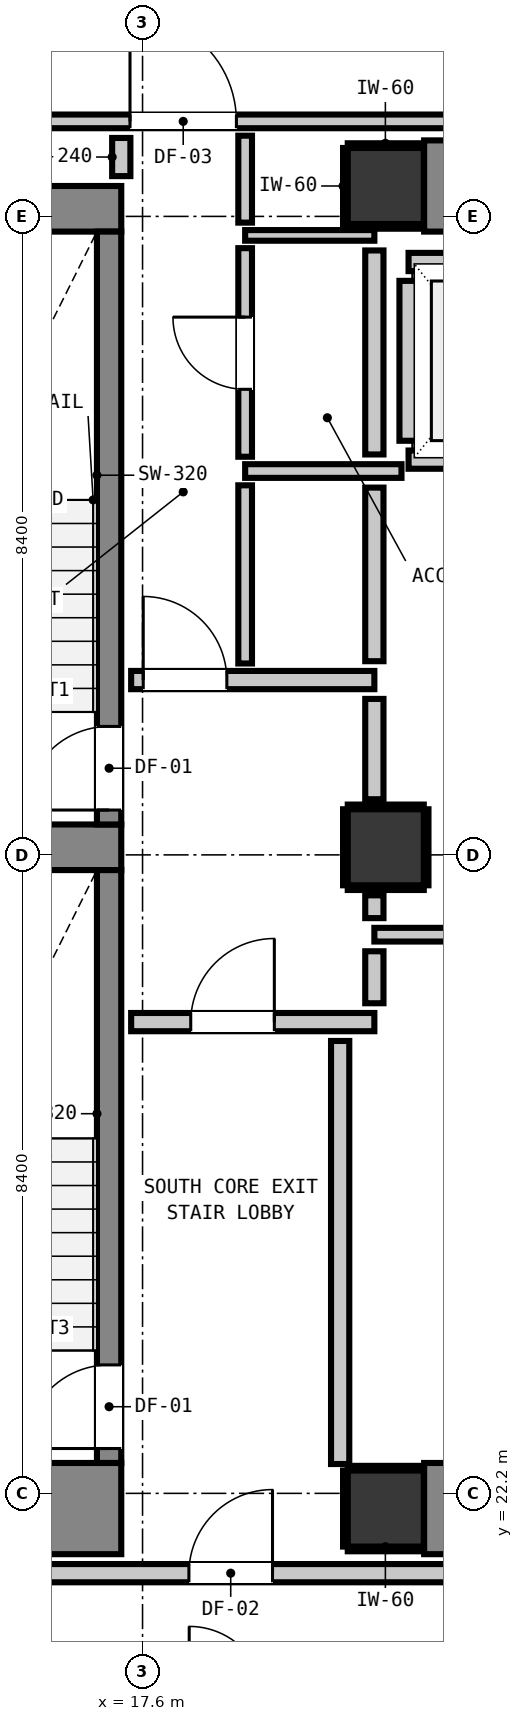
"""IFC4 building model, lengths in metres.
Left out: names, types, materials, properties, quantities, classifications, styles, units other than length and angle.
Written with IfcOpenShell. Run it as: python <this file> out.ifc"""

import sys

from ifc_helpers import new_model, si_unit, direction, frame, frame_2d, origin, origin_2d, place, context, subcontext, project, spatial, rectangle, extrude, element, fill, save


model = new_model("IFC4")
c1 = context("Model", 3, precision=1e-05, world=origin(), true_north=direction((0.0, 1.0)))
c2 = subcontext(c1, "Body", "Model", "MODEL_VIEW")
j1 = project(units=[si_unit("LENGTHUNIT", "METRE"), si_unit("PLANEANGLEUNIT", "RADIAN")], contexts=[c1])
p1 = place(None, origin())
s1 = spatial("IfcSite", under=j1, at=p1, CompositionType="ELEMENT")
p2 = place(p1, origin())
s2 = spatial("IfcBuilding", under=s1, at=p2, CompositionType="ELEMENT")
p3 = place(p2, frame((0.0, 0.0, 68.48)))
s3 = spatial("IfcBuildingStorey", under=s2, at=p3, CompositionType="ELEMENT", Elevation=68.48)
for number, where, z_axis, x_axis in (
    (1, (20.8, 22.0, 0.0), (0.0, 0.0, 1.0), (1.0, 0.0, 0.0)),
    (2, (20.8, 39.4, 0.0), (0.0, 0.0, 1.0), (1.0, 0.0, 0.0)),
):
    element("IfcColumn", number, at=place(p3, frame(where, z_axis=z_axis, x_axis=x_axis)), inside=s3, PredefinedType="COLUMN", context=c2, shape_type="SweptSolid", body=[
        extrude(rectangle(XDim=1.0, YDim=1.0, at=origin_2d()), origin(), (0.0, 0.0, 1.0), 3.32),
    ])
p4 = place(p3, frame((13.24, 22.0, 0.0), z_axis=(0.0, 0.0, 1.0), x_axis=(1.0, 0.0, 0.0)))
e3 = element("IfcWall", 3, at=p4, inside=s3, PredefinedType="SHEAR", context=c2, shape_type="SweptSolid", body=[
    extrude(rectangle(XDim=4.08, YDim=1.2, at=frame_2d((2.04, 0.0))), origin(), (0.0, 0.0, 1.0), 3.32),
])
p5 = place(p3, frame((13.24, 39.1, 0.0), z_axis=(0.0, 0.0, 1.0), x_axis=(1.0, 0.0, 0.0)))
e4 = element("IfcWall", 4, at=p5, inside=s3, PredefinedType="SHEAR", context=c2, shape_type="SweptSolid", body=[
    extrude(rectangle(XDim=4.08, YDim=0.6, at=frame_2d((2.04, 0.0))), origin(), (0.0, 0.0, 1.0), 3.32),
])
p6 = place(p3, frame((13.905, 30.7, 0.0), z_axis=(0.0, 0.0, 1.0), x_axis=(1.0, 0.0, 0.0)))
e5 = element("IfcWall", 5, at=p6, inside=s3, PredefinedType="SHEAR", context=c2, shape_type="SweptSolid", body=[
    extrude(rectangle(XDim=3.415, YDim=0.6, at=frame_2d((1.708, 0.0))), origin(), (0.0, 0.0, 1.0), 3.32),
])
for number, where, z_axis, x_axis in (
    (6, (21.305, 22.0, 0.0), (0.0, 0.0, 1.0), (1.0, 0.0, 0.0)),
    (7, (21.305, 39.4, 0.0), (0.0, 0.0, 1.0), (1.0, 0.0, 0.0)),
):
    element("IfcWall", number, at=place(p3, frame(where, z_axis=z_axis, x_axis=x_axis)), inside=s3, PredefinedType="SHEAR", context=c2, shape_type="SweptSolid", body=[
        extrude(rectangle(XDim=7.39, YDim=1.2, at=frame_2d((3.695, 0.0))), origin(), (0.0, 0.0, 1.0), 3.32),
    ])
p7 = place(p3, frame((17.16, 31.0, 0.0), z_axis=(0.0, 0.0, 1.0), x_axis=(0.0, 1.0, 0.0)))
e8 = element("IfcWall", 8, at=p7, inside=s3, PredefinedType="SHEAR", context=c2, shape_type="SweptSolid", body=[
    extrude(rectangle(XDim=7.8, YDim=0.32, at=frame_2d((3.9, 0.0))), origin(), (0.0, 0.0, 1.0), 3.32),
])
p8 = place(p7, frame((0.19, 0.0, 0.0)))
e9 = element("IfcOpeningElement", 9, at=p8, cuts=e8, PredefinedType="OPENING", context=c2, shape_type="SweptSolid", body=[
    extrude(rectangle(XDim=1.1, YDim=2.15, at=frame_2d((0.55, 1.075))), frame((0.0, 0.17, 0.0), z_axis=(0.0, -1.0, 0.0), x_axis=(1.0, 0.0, 0.0)), (0.0, 0.0, 1.0), 0.34),
])
p9 = place(p3, frame((17.16, 22.6, 0.0), z_axis=(0.0, 0.0, 1.0), x_axis=(0.0, 1.0, 0.0)))
e10 = element("IfcWall", 10, at=p9, inside=s3, PredefinedType="SHEAR", context=c2, shape_type="SweptSolid", body=[
    extrude(rectangle(XDim=7.8, YDim=0.32, at=frame_2d((3.9, 0.0))), origin(), (0.0, 0.0, 1.0), 3.32),
])
p10 = place(p9, frame((0.19, 0.0, 0.0)))
e11 = element("IfcOpeningElement", 11, at=p10, cuts=e10, PredefinedType="OPENING", context=c2, shape_type="SweptSolid", body=[
    extrude(rectangle(XDim=1.1, YDim=2.15, at=frame_2d((0.55, 1.075))), frame((0.0, 0.17, 0.0), z_axis=(0.0, -1.0, 0.0), x_axis=(1.0, 0.0, 0.0)), (0.0, 0.0, 1.0), 0.34),
])
p11 = place(p3, frame((20.8, 30.7, 0.0), z_axis=(0.0, 0.0, 1.0), x_axis=(1.0, 0.0, 0.0)))
e12 = element("IfcColumn", 12, at=p11, inside=s3, PredefinedType="COLUMN", context=c2, shape_type="SweptSolid", body=[
    extrude(rectangle(XDim=1.0, YDim=1.0, at=origin_2d()), origin(), (0.0, 0.0, 1.0), 3.32),
])
for number, where, z_axis, x_axis in (
    (13, (21.1, 35.8, 0.0), (0.0, 0.0, 1.0), (1.0, 0.0, 0.0)),
    (14, (21.1, 38.4, 0.0), (0.0, 0.0, 1.0), (1.0, 0.0, 0.0)),
):
    element("IfcWall", number, at=place(p3, frame(where, z_axis=z_axis, x_axis=x_axis)), inside=s3, PredefinedType="PARTITIONING", context=c2, shape_type="SweptSolid", body=[
        extrude(rectangle(XDim=2.2, YDim=0.24, at=frame_2d((1.1, 0.0))), origin(), (0.0, 0.0, 1.0), 3.06),
    ])
p12 = place(p3, frame((21.1, 36.048, 0.0), z_axis=(0.0, 0.0, 1.0), x_axis=(0.0, 1.0, 0.0)))
e15 = element("IfcWall", 15, at=p12, inside=s3, PredefinedType="PARTITIONING", context=c2, shape_type="SweptSolid", body=[
    extrude(rectangle(XDim=2.104, YDim=0.24, at=frame_2d((1.052, 0.0))), origin(), (0.0, 0.0, 1.0), 2.295),
])
p13 = place(p3, frame((10.15, 21.15, 0.0), z_axis=(0.0, 0.0, 1.0), x_axis=(1.0, 0.0, 0.0)))
e16 = element("IfcWall", 16, at=p13, inside=s3, PredefinedType="PARTITIONING", context=c2, shape_type="SweptSolid", body=[
    extrude(rectangle(XDim=26.779, YDim=0.24, at=frame_2d((13.39, 0.0))), origin(), (0.0, 0.0, 1.0), 3.06),
])
p14 = place(p13, frame((8.06, 0.0, 0.0)))
e17 = element("IfcOpeningElement", 17, at=p14, cuts=e16, PredefinedType="OPENING", context=c2, shape_type="SweptSolid", body=[
    extrude(rectangle(XDim=1.1, YDim=2.15, at=frame_2d((0.55, 1.075))), frame((0.0, 0.13, 0.0), z_axis=(0.0, -1.0, 0.0), x_axis=(1.0, 0.0, 0.0)), (0.0, 0.0, 1.0), 0.26),
])
p15 = place(p13, frame((0.324, 0.0, 0.0)))
e18 = element("IfcOpeningElement", 18, at=p15, cuts=e16, PredefinedType="OPENING", context=c2, shape_type="SweptSolid", body=[
    extrude(rectangle(XDim=1.4, YDim=2.15, at=frame_2d((0.7, 1.075))), frame((0.0, 0.13, 0.0), z_axis=(0.0, -1.0, 0.0), x_axis=(1.0, 0.0, 0.0)), (0.0, 0.0, 1.0), 0.26),
])
p16 = place(p3, frame((17.45, 28.4, 0.0), z_axis=(0.0, 0.0, 1.0), x_axis=(1.0, 0.0, 0.0)))
e19 = element("IfcWall", 19, at=p16, inside=s3, PredefinedType="PARTITIONING", context=c2, shape_type="SweptSolid", body=[
    extrude(rectangle(XDim=3.2, YDim=0.24, at=frame_2d((1.6, 0.0))), origin(), (0.0, 0.0, 1.0), 3.06),
])
p17 = place(p16, frame((0.784, 0.0, 0.0)))
e20 = element("IfcOpeningElement", 20, at=p17, cuts=e19, PredefinedType="OPENING", context=c2, shape_type="SweptSolid", body=[
    extrude(rectangle(XDim=1.1, YDim=2.15, at=frame_2d((0.55, 1.075))), frame((0.0, 0.13, 0.0), z_axis=(0.0, -1.0, 0.0), x_axis=(1.0, 0.0, 0.0)), (0.0, 0.0, 1.0), 0.26),
])
p18 = place(p3, frame((17.45, 32.9, 0.0), z_axis=(0.0, 0.0, 1.0), x_axis=(1.0, 0.0, 0.0)))
e21 = element("IfcWall", 21, at=p18, inside=s3, PredefinedType="PARTITIONING", context=c2, shape_type="SweptSolid", body=[
    extrude(rectangle(XDim=3.2, YDim=0.24, at=frame_2d((1.6, 0.0))), origin(), (0.0, 0.0, 1.0), 3.06),
])
p19 = place(p18, frame((0.159, 0.0, 0.0)))
e22 = element("IfcOpeningElement", 22, at=p19, cuts=e21, PredefinedType="OPENING", context=c2, shape_type="SweptSolid", body=[
    extrude(rectangle(XDim=1.1, YDim=2.15, at=frame_2d((0.55, 1.075))), frame((0.0, 0.13, 0.0), z_axis=(0.0, -1.0, 0.0), x_axis=(1.0, 0.0, 0.0)), (0.0, 0.0, 1.0), 0.26),
])
p20 = place(p3, frame((20.65, 29.55, 0.0), z_axis=(0.0, 0.0, 1.0), x_axis=(1.0, 0.0, 0.0)))
e23 = element("IfcWall", 23, at=p20, inside=s3, PredefinedType="PARTITIONING", context=c2, shape_type="SweptSolid", body=[
    extrude(rectangle(XDim=9.325, YDim=0.18, at=frame_2d((4.663, 0.0))), origin(), (0.0, 0.0, 1.0), 3.06),
])
p21 = place(p3, frame((18.95, 35.65, 0.0), z_axis=(0.0, 0.0, 1.0), x_axis=(1.0, 0.0, 0.0)))
e24 = element("IfcWall", 24, at=p21, inside=s3, PredefinedType="PARTITIONING", context=c2, shape_type="SweptSolid", body=[
    extrude(rectangle(XDim=2.057, YDim=0.18, at=frame_2d((1.029, 0.0))), origin(), (0.0, 0.0, 1.0), 3.06),
])
p22 = place(p3, frame((10.15, 40.25, 0.0), z_axis=(0.0, 0.0, 1.0), x_axis=(1.0, 0.0, 0.0)))
e25 = element("IfcWall", 25, at=p22, inside=s3, PredefinedType="PARTITIONING", context=c2, shape_type="SweptSolid", body=[
    extrude(rectangle(XDim=40.023, YDim=0.18, at=frame_2d((20.012, 0.0))), origin(), (0.0, 0.0, 1.0), 3.06),
])
p23 = place(p22, frame((7.285, 0.0, 0.0)))
e26 = element("IfcOpeningElement", 26, at=p23, cuts=e25, PredefinedType="OPENING", context=c2, shape_type="SweptSolid", body=[
    extrude(rectangle(XDim=1.4, YDim=2.15, at=frame_2d((0.7, 1.075))), frame((0.0, 0.1, 0.0), z_axis=(0.0, -1.0, 0.0), x_axis=(1.0, 0.0, 0.0)), (0.0, 0.0, 1.0), 0.2),
])
p24 = place(p22, frame((0.324, 0.0, 0.0)))
e27 = element("IfcOpeningElement", 27, at=p24, cuts=e25, PredefinedType="OPENING", context=c2, shape_type="SweptSolid", body=[
    extrude(rectangle(XDim=1.4, YDim=2.15, at=frame_2d((0.7, 1.075))), frame((0.0, 0.1, 0.0), z_axis=(0.0, -1.0, 0.0), x_axis=(1.0, 0.0, 0.0)), (0.0, 0.0, 1.0), 0.2),
])
p25 = place(p22, frame((33.574, 0.0, 0.0)))
e28 = element("IfcOpeningElement", 28, at=p25, cuts=e25, PredefinedType="OPENING", context=c2, shape_type="SweptSolid", body=[
    extrude(rectangle(XDim=1.0, YDim=2.15, at=frame_2d((0.5, 1.075))), frame((0.0, 0.1, 0.0), z_axis=(0.0, -1.0, 0.0), x_axis=(1.0, 0.0, 0.0)), (0.0, 0.0, 1.0), 0.2),
])
p26 = place(p3, frame((18.95, 38.75, 0.0), z_axis=(0.0, 0.0, 1.0), x_axis=(1.0, 0.0, 0.0)))
e29 = element("IfcWall", 29, at=p26, inside=s3, PredefinedType="PARTITIONING", context=c2, shape_type="SweptSolid", body=[
    extrude(rectangle(XDim=1.7, YDim=0.14, at=frame_2d((0.85, 0.0))), origin(), (0.0, 0.0, 1.0), 3.06),
])
p27 = place(p3, frame((17.32, 39.53, 0.0), z_axis=(0.0, 0.0, 1.0), x_axis=(0.0, 1.0, 0.0)))
e30 = element("IfcWall", 30, at=p27, inside=s3, PredefinedType="PARTITIONING", context=c2, shape_type="SweptSolid", body=[
    extrude(rectangle(XDim=0.502, YDim=0.24, at=frame_2d((0.251, 0.0))), origin(), (0.0, 0.0, 1.0), 3.06),
])
p28 = place(p3, frame((20.2, 22.586, 0.0), z_axis=(0.0, 0.0, 1.0), x_axis=(0.0, 1.0, 0.0)))
e31 = element("IfcWall", 31, at=p28, inside=s3, PredefinedType="PARTITIONING", context=c2, shape_type="SweptSolid", body=[
    extrude(rectangle(XDim=5.566, YDim=0.24, at=frame_2d((2.783, 0.0))), origin(), (0.0, 0.0, 1.0), 3.06),
])
p29 = place(p3, frame((20.65, 28.648, 0.0), z_axis=(0.0, 0.0, 1.0), x_axis=(0.0, 1.0, 0.0)))
e32 = element("IfcWall", 32, at=p29, inside=s3, PredefinedType="PARTITIONING", context=c2, shape_type="SweptSolid", body=[
    extrude(rectangle(XDim=0.684, YDim=0.24, at=frame_2d((0.342, 0.0))), origin(), (0.0, 0.0, 1.0), 2.295),
])
p30 = place(p3, frame((20.65, 29.768, 0.0), z_axis=(0.0, 0.0, 1.0), x_axis=(0.0, 1.0, 0.0)))
e33 = element("IfcWall", 33, at=p30, inside=s3, PredefinedType="PARTITIONING", context=c2, shape_type="SweptSolid", body=[
    extrude(rectangle(XDim=0.3, YDim=0.24, at=frame_2d((0.15, 0.0))), origin(), (0.0, 0.0, 1.0), 2.295),
])
p31 = place(p3, frame((20.65, 31.332, 0.0), z_axis=(0.0, 0.0, 1.0), x_axis=(0.0, 1.0, 0.0)))
e34 = element("IfcWall", 34, at=p31, inside=s3, PredefinedType="PARTITIONING", context=c2, shape_type="SweptSolid", body=[
    extrude(rectangle(XDim=1.32, YDim=0.24, at=frame_2d((0.66, 0.0))), origin(), (0.0, 0.0, 1.0), 2.295),
])
p32 = place(p3, frame((20.65, 33.148, 0.0), z_axis=(0.0, 0.0, 1.0), x_axis=(0.0, 1.0, 0.0)))
e35 = element("IfcWall", 35, at=p32, inside=s3, PredefinedType="PARTITIONING", context=c2, shape_type="SweptSolid", body=[
    extrude(rectangle(XDim=2.284, YDim=0.24, at=frame_2d((1.142, 0.0))), origin(), (0.0, 0.0, 1.0), 2.295),
])
p33 = place(p3, frame((20.65, 35.868, 0.0), z_axis=(0.0, 0.0, 1.0), x_axis=(0.0, 1.0, 0.0)))
e36 = element("IfcWall", 36, at=p33, inside=s3, PredefinedType="PARTITIONING", context=c2, shape_type="SweptSolid", body=[
    extrude(rectangle(XDim=2.684, YDim=0.24, at=frame_2d((1.342, 0.0))), origin(), (0.0, 0.0, 1.0), 2.295),
])
p34 = place(p3, frame((18.95, 33.118, 0.0), z_axis=(0.0, 0.0, 1.0), x_axis=(0.0, 1.0, 0.0)))
e37 = element("IfcWall", 37, at=p34, inside=s3, PredefinedType="PARTITIONING", context=c2, shape_type="SweptSolid", body=[
    extrude(rectangle(XDim=2.344, YDim=0.18, at=frame_2d((1.172, 0.0))), origin(), (0.0, 0.0, 1.0), 3.06),
])
p35 = place(p3, frame((18.95, 35.838, 0.0), z_axis=(0.0, 0.0, 1.0), x_axis=(0.0, 1.0, 0.0)))
e38 = element("IfcWall", 38, at=p35, inside=s3, PredefinedType="PARTITIONING", context=c2, shape_type="SweptSolid", body=[
    extrude(rectangle(XDim=2.744, YDim=0.18, at=frame_2d((1.372, 0.0))), origin(), (0.0, 0.0, 1.0), 3.06),
])
p36 = place(p35, frame((0.887, 0.0, 0.0)))
e39 = element("IfcOpeningElement", 39, at=p36, cuts=e38, PredefinedType="OPENING", context=c2, shape_type="SweptSolid", body=[
    extrude(rectangle(XDim=0.95, YDim=2.1, at=frame_2d((0.475, 1.05))), frame((0.0, 0.1, 0.0), z_axis=(0.0, -1.0, 0.0), x_axis=(1.0, 0.0, 0.0)), (0.0, 0.0, 1.0), 0.2),
])
p37 = place(p3, frame((18.95, 38.918, 0.0), z_axis=(0.0, 0.0, 1.0), x_axis=(0.0, 1.0, 0.0)))
e40 = element("IfcWall", 40, at=p37, inside=s3, PredefinedType="PARTITIONING", context=c2, shape_type="SweptSolid", body=[
    extrude(rectangle(XDim=1.144, YDim=0.18, at=frame_2d((0.572, 0.0))), origin(), (0.0, 0.0, 1.0), 3.06),
])
for number, where, z_axis, x_axis in (
    (41, (20.3, 21.468, 0.0), (0.0, 0.0, 1.0), (1.0, 0.0, 0.0)),
    (42, (20.3, 22.532, 0.0), (0.0, 0.0, 1.0), (1.0, 0.0, 0.0)),
):
    element("IfcWall", number, at=place(p3, frame(where, z_axis=z_axis, x_axis=x_axis)), inside=s3, PredefinedType="PARTITIONING", context=c2, shape_type="SweptSolid", body=[
        extrude(rectangle(XDim=0.99, YDim=0.06, at=frame_2d((0.495, 0.0))), origin(), (0.0, 0.0, 1.0), 1.45),
    ])
p38 = place(p3, frame((20.268, 21.5, 0.0), z_axis=(0.0, 0.0, 1.0), x_axis=(0.0, 1.0, 0.0)))
e43 = element("IfcWall", 43, at=p38, inside=s3, PredefinedType="PARTITIONING", context=c2, shape_type="SweptSolid", body=[
    extrude(rectangle(XDim=1.0, YDim=0.06, at=frame_2d((0.5, 0.0))), origin(), (0.0, 0.0, 1.0), 1.45),
])
for number, where, z_axis, x_axis in (
    (44, (20.3, 38.868, 0.0), (0.0, 0.0, 1.0), (1.0, 0.0, 0.0)),
    (45, (20.3, 39.932, 0.0), (0.0, 0.0, 1.0), (1.0, 0.0, 0.0)),
):
    element("IfcWall", number, at=place(p3, frame(where, z_axis=z_axis, x_axis=x_axis)), inside=s3, PredefinedType="PARTITIONING", context=c2, shape_type="SweptSolid", body=[
        extrude(rectangle(XDim=0.99, YDim=0.06, at=frame_2d((0.495, 0.0))), origin(), (0.0, 0.0, 1.0), 1.45),
    ])
for number, where, z_axis, x_axis in (
    (46, (20.268, 38.9, 0.0), (0.0, 0.0, 1.0), (0.0, 1.0, 0.0)),
    (47, (20.3, 30.168, 0.0), (0.0, 0.0, 1.0), (1.0, 0.0, 0.0)),
    (48, (20.3, 31.232, 0.0), (0.0, 0.0, 1.0), (1.0, 0.0, 0.0)),
    (49, (20.268, 30.2, 0.0), (0.0, 0.0, 1.0), (0.0, 1.0, 0.0)),
    (50, (21.332, 30.2, 0.0), (0.0, 0.0, 1.0), (0.0, 1.0, 0.0)),
):
    element("IfcWall", number, at=place(p3, frame(where, z_axis=z_axis, x_axis=x_axis)), inside=s3, PredefinedType="PARTITIONING", context=c2, shape_type="SweptSolid", body=[
        extrude(rectangle(XDim=1.0, YDim=0.06, at=frame_2d((0.5, 0.0))), origin(), (0.0, 0.0, 1.0), 1.45),
    ])
p39 = place(p8, origin())
e51 = element("IfcDoor", 51, at=p39, inside=s3, OperationType="SINGLE_SWING_LEFT", PredefinedType="DOOR", context=c2, shape_type="SweptSolid", body=[
    extrude(rectangle(XDim=1.1, YDim=2.15, at=frame_2d((0.55, 1.075))), frame((0.0, 0.025, 0.0), z_axis=(0.0, -1.0, 0.0), x_axis=(1.0, 0.0, 0.0)), (0.0, 0.0, 1.0), 0.05),
])
fill(e9, e51)
p40 = place(p10, origin())
e52 = element("IfcDoor", 52, at=p40, inside=s3, OperationType="SINGLE_SWING_LEFT", PredefinedType="DOOR", context=c2, shape_type="SweptSolid", body=[
    extrude(rectangle(XDim=1.1, YDim=2.15, at=frame_2d((0.55, 1.075))), frame((0.0, 0.025, 0.0), z_axis=(0.0, -1.0, 0.0), x_axis=(1.0, 0.0, 0.0)), (0.0, 0.0, 1.0), 0.05),
])
fill(e11, e52)
p41 = place(p17, origin())
e53 = element("IfcDoor", 53, at=p41, inside=s3, OperationType="SINGLE_SWING_RIGHT", PredefinedType="DOOR", context=c2, shape_type="SweptSolid", body=[
    extrude(rectangle(XDim=1.1, YDim=2.15, at=frame_2d((0.55, 1.075))), frame((0.0, 0.025, 0.0), z_axis=(0.0, -1.0, 0.0), x_axis=(1.0, 0.0, 0.0)), (0.0, 0.0, 1.0), 0.05),
])
fill(e20, e53)
p42 = place(p19, origin())
e54 = element("IfcDoor", 54, at=p42, inside=s3, OperationType="SINGLE_SWING_LEFT", PredefinedType="DOOR", context=c2, shape_type="SweptSolid", body=[
    extrude(rectangle(XDim=1.1, YDim=2.15, at=frame_2d((0.55, 1.075))), frame((0.0, 0.025, 0.0), z_axis=(0.0, -1.0, 0.0), x_axis=(1.0, 0.0, 0.0)), (0.0, 0.0, 1.0), 0.05),
])
fill(e22, e54)
p43 = place(p14, origin())
e55 = element("IfcDoor", 55, at=p43, inside=s3, OperationType="SINGLE_SWING_RIGHT", PredefinedType="DOOR", context=c2, shape_type="SweptSolid", body=[
    extrude(rectangle(XDim=1.1, YDim=2.15, at=frame_2d((0.55, 1.075))), frame((0.0, 0.025, 0.0), z_axis=(0.0, -1.0, 0.0), x_axis=(1.0, 0.0, 0.0)), (0.0, 0.0, 1.0), 0.05),
])
fill(e17, e55)
p44 = place(p23, origin())
e56 = element("IfcDoor", 56, at=p44, inside=s3, OperationType="SINGLE_SWING_LEFT", PredefinedType="DOOR", context=c2, shape_type="SweptSolid", body=[
    extrude(rectangle(XDim=1.4, YDim=2.15, at=frame_2d((0.7, 1.075))), frame((0.0, 0.025, 0.0), z_axis=(0.0, -1.0, 0.0), x_axis=(1.0, 0.0, 0.0)), (0.0, 0.0, 1.0), 0.05),
])
fill(e26, e56)
p45 = place(p36, origin())
e57 = element("IfcDoor", 57, at=p45, inside=s3, OperationType="SINGLE_SWING_RIGHT", PredefinedType="DOOR", context=c2, shape_type="SweptSolid", body=[
    extrude(rectangle(XDim=0.95, YDim=2.1, at=frame_2d((0.475, 1.05))), frame((0.0, 0.025, 0.0), z_axis=(0.0, -1.0, 0.0), x_axis=(1.0, 0.0, 0.0)), (0.0, 0.0, 1.0), 0.05),
])
fill(e39, e57)
save(model, sys.argv[1])
